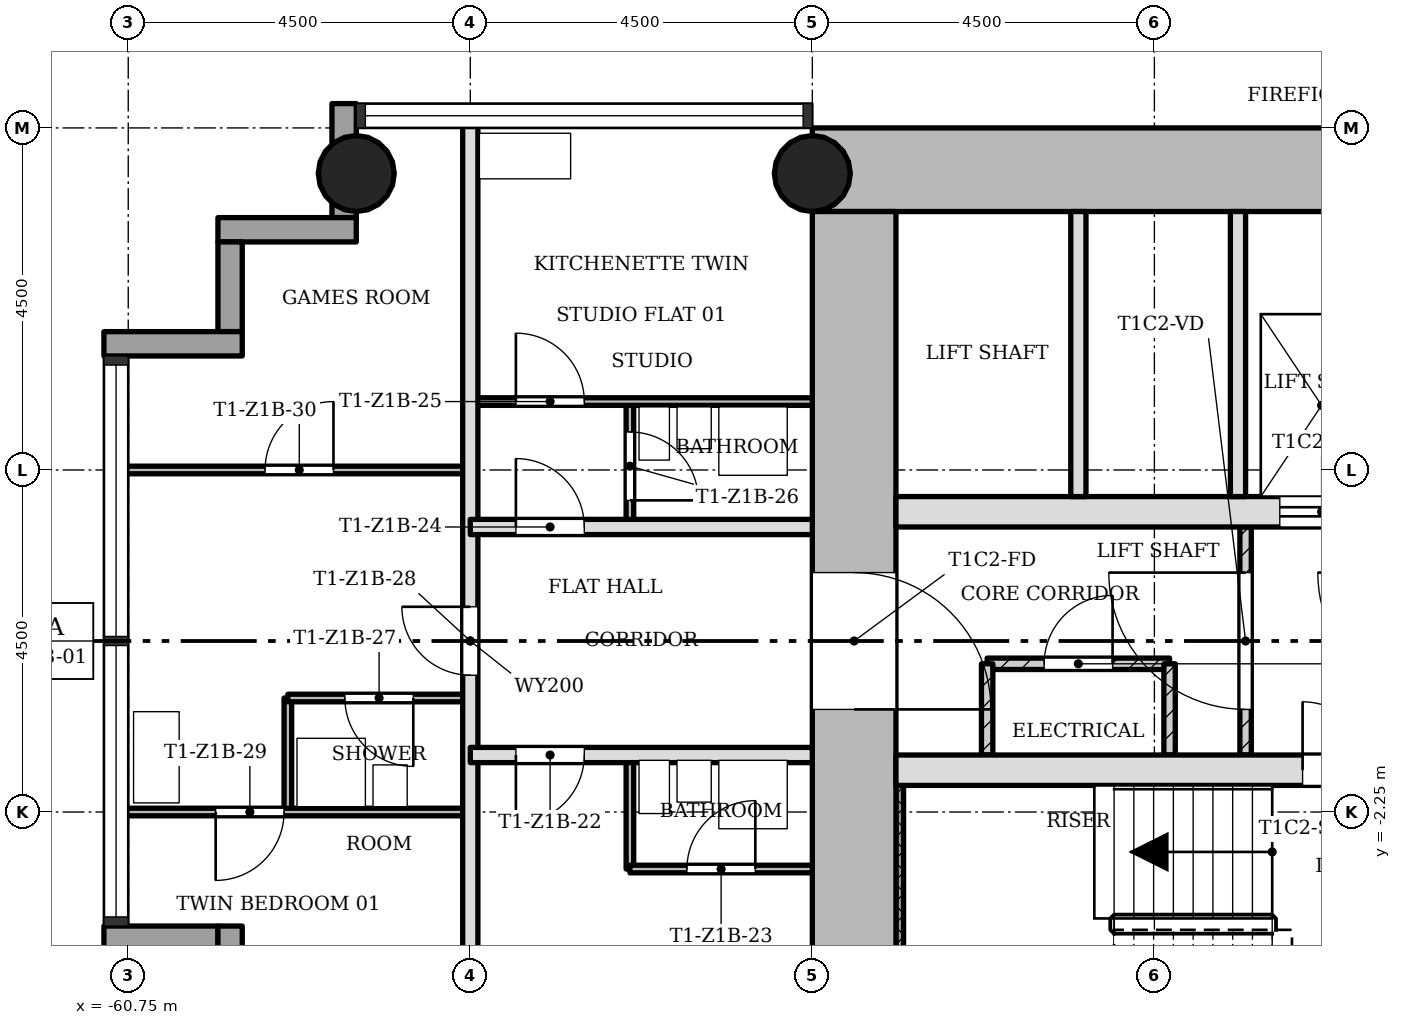
"""IFC4 building model, lengths in metres.
Left out: names, types, materials, properties, quantities, classifications, styles, units other than length and angle.
Written with IfcOpenShell. Run it as: python <this file> out.ifc"""

import sys

from ifc_helpers import new_model, si_unit, direction, frame, frame_2d, origin, origin_2d, place, context, subcontext, project, spatial, rectangle, hollow_circle, extrude, element, fill, save


model = new_model("IFC4")
c1 = context("Model", 3, precision=1e-05, world=origin(), true_north=direction((0.0, 1.0)))
c2 = subcontext(c1, "Body", "Model", "MODEL_VIEW")
j1 = project(units=[si_unit("LENGTHUNIT", "METRE"), si_unit("PLANEANGLEUNIT", "RADIAN")], contexts=[c1])
p1 = place(None, origin())
s1 = spatial("IfcSite", under=j1, at=p1, CompositionType="ELEMENT")
p2 = place(p1, origin())
s2 = spatial("IfcBuilding", under=s1, at=p2, CompositionType="ELEMENT")
p3 = place(p2, frame((0.0, 0.0, 34.7)))
s3 = spatial("IfcBuildingStorey", under=s2, at=p3, CompositionType="ELEMENT", Elevation=34.7)
p4 = place(p3, frame((-43.85, 6.2, 0.0), z_axis=(0.0, 0.0, 1.0), x_axis=(-1.0, 0.0, 0.0)))
e1 = element("IfcWall", 1, at=p4, inside=s3, PredefinedType="SHEAR", context=c2, shape_type="SweptSolid", body=[
    extrude(rectangle(XDim=7.9, YDim=1.1, at=frame_2d((3.95, 0.0))), origin(), (0.0, 0.0, 1.0), 3.4),
])
p5 = place(p3, frame((-51.2, 5.65, 0.0), z_axis=(0.0, 0.0, 1.0), x_axis=(0.0, -1.0, 0.0)))
e2 = element("IfcWall", 2, at=p5, inside=s3, PredefinedType="SHEAR", context=c2, shape_type="SweptSolid", body=[
    extrude(rectangle(XDim=12.4, YDim=1.1, at=frame_2d((6.2, 0.0))), origin(), (0.0, 0.0, 1.0), 3.4),
])
p6 = place(p5, frame((4.75, 0.0, 0.0)))
e3 = element("IfcOpeningElement", 3, at=p6, cuts=e2, PredefinedType="OPENING", context=c2, shape_type="SweptSolid", body=[
    extrude(rectangle(XDim=1.8, YDim=2.1, at=frame_2d((0.9, 1.05))), frame((0.0, 0.56, 0.0), z_axis=(0.0, -1.0, 0.0), x_axis=(1.0, 0.0, 0.0)), (0.0, 0.0, 1.0), 1.12),
])
p7 = place(p3, frame((-50.65, -1.7, 0.0), z_axis=(0.0, 0.0, 1.0), x_axis=(1.0, 0.0, 0.0)))
e4 = element("IfcWall", 4, at=p7, inside=s3, PredefinedType="SHEAR", context=c2, shape_type="SweptSolid", body=[
    extrude(rectangle(XDim=6.8, YDim=0.4, at=frame_2d((3.4, 0.0))), origin(), (0.0, 0.0, 1.0), 3.4),
])
p8 = place(p7, frame((5.35, 0.0, 0.0)))
e5 = element("IfcOpeningElement", 5, at=p8, cuts=e4, PredefinedType="OPENING", context=c2, shape_type="SweptSolid", body=[
    extrude(rectangle(XDim=0.9, YDim=2.1, at=frame_2d((0.45, 1.05))), frame((0.0, 0.21, 0.0), z_axis=(0.0, -1.0, 0.0), x_axis=(1.0, 0.0, 0.0)), (0.0, 0.0, 1.0), 0.42),
])
p9 = place(p3, frame((-50.65, 1.7, 0.0), z_axis=(0.0, 0.0, 1.0), x_axis=(1.0, 0.0, 0.0)))
e6 = element("IfcWall", 6, at=p9, inside=s3, PredefinedType="SHEAR", context=c2, shape_type="SweptSolid", body=[
    extrude(rectangle(XDim=6.8, YDim=0.4, at=frame_2d((3.4, 0.0))), origin(), (0.0, 0.0, 1.0), 3.4),
])
p10 = place(p9, frame((5.05, 0.0, 0.0)))
e7 = element("IfcOpeningElement", 7, at=p10, cuts=e6, PredefinedType="OPENING", context=c2, shape_type="SweptSolid", body=[
    extrude(rectangle(XDim=1.1, YDim=2.1, at=frame_2d((0.55, 1.05))), frame((0.0, 0.21, 0.0), z_axis=(0.0, -1.0, 0.0), x_axis=(1.0, 0.0, 0.0)), (0.0, 0.0, 1.0), 0.42),
])
for number, where, z_axis, x_axis in (
    (8, (-51.75, 6.15, 0.0), (0.0, 0.0, 1.0), (1.0, 0.0, 0.0)),
    (9, (-57.75, 6.15, 0.0), (0.0, 0.0, 1.0), (1.0, 0.0, 0.0)),
):
    element("IfcColumn", number, at=place(p3, frame(where, z_axis=z_axis, x_axis=x_axis)), inside=s3, PredefinedType="COLUMN", context=c2, shape_type="SweptSolid", body=[
        extrude(hollow_circle(Radius=0.5, WallThickness=0.036, at=origin_2d()), origin(), (0.0, 0.0, 1.0), 3.4),
    ])
p11 = place(p3, frame((-61.07, -3.91, -0.3), z_axis=(0.0, 0.0, 1.0), x_axis=(1.0, 0.0, 0.0)))
e10 = element("IfcWall", 10, at=p11, inside=s3, PredefinedType="STANDARD", context=c2, shape_type="SweptSolid", body=[
    extrude(rectangle(XDim=1.5, YDim=0.32, at=frame_2d((0.75, 0.0))), origin(), (0.0, 0.0, 1.0), 3.4),
])
p12 = place(p3, frame((-59.41, -3.75, -0.3), z_axis=(0.0, 0.0, 1.0), x_axis=(0.0, -1.0, 0.0)))
e11 = element("IfcWall", 11, at=p12, inside=s3, PredefinedType="STANDARD", context=c2, shape_type="SweptSolid", body=[
    extrude(rectangle(XDim=1.82, YDim=0.32, at=frame_2d((0.91, 0.0))), origin(), (0.0, 0.0, 1.0), 3.4),
])
p13 = place(p12, frame((0.41, 0.0, 1.2)))
e12 = element("IfcOpeningElement", 12, at=p13, cuts=e11, PredefinedType="OPENING", context=c2, shape_type="SweptSolid", body=[
    extrude(rectangle(XDim=1.0, YDim=1.5, at=frame_2d((0.5, 0.75))), frame((0.0, 0.17, 0.0), z_axis=(0.0, -1.0, 0.0), x_axis=(1.0, 0.0, 0.0)), (0.0, 0.0, 1.0), 0.34),
])
p14 = place(p3, frame((-57.91, 7.07, -0.3), z_axis=(0.0, 0.0, 1.0), x_axis=(0.0, -1.0, 0.0)))
e13 = element("IfcWall", 13, at=p14, inside=s3, PredefinedType="STANDARD", context=c2, shape_type="SweptSolid", body=[
    extrude(rectangle(XDim=1.5, YDim=0.32, at=frame_2d((0.75, 0.0))), origin(), (0.0, 0.0, 1.0), 3.4),
])
p15 = place(p3, frame((-57.75, 5.41, -0.3), z_axis=(0.0, 0.0, 1.0), x_axis=(-1.0, 0.0, 0.0)))
e14 = element("IfcWall", 14, at=p15, inside=s3, PredefinedType="STANDARD", context=c2, shape_type="SweptSolid", body=[
    extrude(rectangle(XDim=1.82, YDim=0.32, at=frame_2d((0.91, 0.0))), origin(), (0.0, 0.0, 1.0), 3.4),
])
p16 = place(p3, frame((-59.41, 5.25, -0.3), z_axis=(0.0, 0.0, 1.0), x_axis=(0.0, -1.0, 0.0)))
e15 = element("IfcWall", 15, at=p16, inside=s3, PredefinedType="STANDARD", context=c2, shape_type="SweptSolid", body=[
    extrude(rectangle(XDim=1.18, YDim=0.32, at=frame_2d((0.59, 0.0))), origin(), (0.0, 0.0, 1.0), 3.4),
])
p17 = place(p3, frame((-59.25, 3.91, -0.3), z_axis=(0.0, 0.0, 1.0), x_axis=(-1.0, 0.0, 0.0)))
e16 = element("IfcWall", 16, at=p17, inside=s3, PredefinedType="STANDARD", context=c2, shape_type="SweptSolid", body=[
    extrude(rectangle(XDim=1.82, YDim=0.32, at=frame_2d((0.91, 0.0))), origin(), (0.0, 0.0, 1.0), 3.4),
])
p18 = place(p3, frame((-46.05, 1.5, 0.0), z_axis=(0.0, 0.0, 1.0), x_axis=(0.0, -1.0, 0.0)))
e17 = element("IfcWall", 17, at=p18, inside=s3, PredefinedType="PARTITIONING", context=c2, shape_type="SweptSolid", body=[
    extrude(rectangle(XDim=3.0, YDim=0.15, at=frame_2d((1.5, 0.0))), origin(), (0.0, 0.0, 1.0), 3.0),
])
p19 = place(p18, frame((0.6, 0.0, 0.0)))
e18 = element("IfcOpeningElement", 18, at=p19, cuts=e17, PredefinedType="OPENING", context=c2, shape_type="SweptSolid", body=[
    extrude(rectangle(XDim=1.8, YDim=2.1, at=frame_2d((0.9, 1.05))), frame((0.0, 0.085, 0.0), z_axis=(0.0, -1.0, 0.0), x_axis=(1.0, 0.0, 0.0)), (0.0, 0.0, 1.0), 0.17),
])
for number, where, z_axis, x_axis in (
    (19, (-46.15, 5.65, 0.0), (0.0, 0.0, 1.0), (0.0, -1.0, 0.0)),
    (20, (-48.25, 5.65, 0.0), (0.0, 0.0, 1.0), (0.0, -1.0, 0.0)),
):
    element("IfcWall", number, at=place(p3, frame(where, z_axis=z_axis, x_axis=x_axis)), inside=s3, PredefinedType="SOLIDWALL", context=c2, shape_type="SweptSolid", body=[
        extrude(rectangle(XDim=3.75, YDim=0.2, at=frame_2d((1.875, 0.0))), origin(), (0.0, 0.0, 1.0), 3.0),
    ])
p20 = place(p3, frame((-47.05, -0.3, 0.0), z_axis=(0.0, 0.0, 1.0), x_axis=(-1.0, 0.0, 0.0)))
e21 = element("IfcWall", 21, at=p20, inside=s3, PredefinedType="PARTITIONING", context=c2, shape_type="SweptSolid", body=[
    extrude(rectangle(XDim=2.4, YDim=0.15, at=frame_2d((1.2, 0.0))), origin(), (0.0, 0.0, 1.0), 3.0),
])
p21 = place(p20, frame((0.75, 0.0, 0.0)))
e22 = element("IfcOpeningElement", 22, at=p21, cuts=e21, PredefinedType="OPENING", context=c2, shape_type="SweptSolid", body=[
    extrude(rectangle(XDim=0.9, YDim=2.1, at=frame_2d((0.45, 1.05))), frame((0.0, 0.085, 0.0), z_axis=(0.0, -1.0, 0.0), x_axis=(1.0, 0.0, 0.0)), (0.0, 0.0, 1.0), 0.17),
])
for number, where, z_axis, x_axis in (
    (23, (-47.05, -0.3, 0.0), (0.0, 0.0, 1.0), (0.0, -1.0, 0.0)),
    (24, (-49.45, -0.3, 0.0), (0.0, 0.0, 1.0), (0.0, -1.0, 0.0)),
):
    element("IfcWall", number, at=place(p3, frame(where, z_axis=z_axis, x_axis=x_axis)), inside=s3, PredefinedType="PARTITIONING", context=c2, shape_type="SweptSolid", body=[
        extrude(rectangle(XDim=1.2, YDim=0.15, at=frame_2d((0.6, 0.0))), origin(), (0.0, 0.0, 1.0), 3.0),
    ])
p22 = place(p3, frame((-58.65, -2.25, 0.0), z_axis=(0.0, 0.0, 1.0), x_axis=(0.0, 1.0, 0.0)))
e25 = element("IfcWall", 25, at=p22, inside=s3, PredefinedType="PARTITIONING", context=c2, shape_type="SweptSolid", body=[
    extrude(rectangle(XDim=1.5, YDim=0.1, at=frame_2d((0.75, 0.0))), origin(), (0.0, 0.0, 1.0), 3.0),
])
p23 = place(p3, frame((-56.25, -6.85, 0.0), z_axis=(0.0, 0.0, 1.0), x_axis=(0.0, 1.0, 0.0)))
e26 = element("IfcWall", 26, at=p23, inside=s3, PredefinedType="SOLIDWALL", context=c2, shape_type="SweptSolid", body=[
    extrude(rectangle(XDim=13.7, YDim=0.2, at=frame_2d((6.85, 0.0))), origin(), (0.0, 0.0, 1.0), 3.0),
])
p24 = place(p23, frame((6.4, 0.0, 0.0)))
e27 = element("IfcOpeningElement", 27, at=p24, cuts=e26, PredefinedType="OPENING", context=c2, shape_type="SweptSolid", body=[
    extrude(rectangle(XDim=0.9, YDim=2.1, at=frame_2d((0.45, 1.05))), frame((0.0, 0.11, 0.0), z_axis=(0.0, -1.0, 0.0), x_axis=(1.0, 0.0, 0.0)), (0.0, 0.0, 1.0), 0.22),
])
p25 = place(p3, frame((-54.15, -3.0, 0.0), z_axis=(0.0, 0.0, 1.0), x_axis=(0.0, 1.0, 0.0)))
e28 = element("IfcWall", 28, at=p25, inside=s3, PredefinedType="PARTITIONING", context=c2, shape_type="SweptSolid", body=[
    extrude(rectangle(XDim=1.5, YDim=0.1, at=frame_2d((0.75, 0.0))), origin(), (0.0, 0.0, 1.0), 3.0),
])
p26 = place(p3, frame((-54.15, 1.5, 0.0), z_axis=(0.0, 0.0, 1.0), x_axis=(0.0, 1.0, 0.0)))
e29 = element("IfcWall", 29, at=p26, inside=s3, PredefinedType="PARTITIONING", context=c2, shape_type="SweptSolid", body=[
    extrude(rectangle(XDim=1.65, YDim=0.1, at=frame_2d((0.825, 0.0))), origin(), (0.0, 0.0, 1.0), 3.0),
])
p27 = place(p26, frame((0.35, 0.0, 0.0)))
e30 = element("IfcOpeningElement", 30, at=p27, cuts=e29, PredefinedType="OPENING", context=c2, shape_type="SweptSolid", body=[
    extrude(rectangle(XDim=0.9, YDim=2.1, at=frame_2d((0.45, 1.05))), frame((0.0, 0.06, 0.0), z_axis=(0.0, -1.0, 0.0), x_axis=(1.0, 0.0, 0.0)), (0.0, 0.0, 1.0), 0.12),
])
p28 = place(p3, frame((-54.15, -3.0, 0.0), z_axis=(0.0, 0.0, 1.0), x_axis=(1.0, 0.0, 0.0)))
e31 = element("IfcWall", 31, at=p28, inside=s3, PredefinedType="PARTITIONING", context=c2, shape_type="SweptSolid", body=[
    extrude(rectangle(XDim=2.4, YDim=0.1, at=frame_2d((1.2, 0.0))), origin(), (0.0, 0.0, 1.0), 3.0),
])
p29 = place(p28, frame((0.75, 0.0, 0.0)))
e32 = element("IfcOpeningElement", 32, at=p29, cuts=e31, PredefinedType="OPENING", context=c2, shape_type="SweptSolid", body=[
    extrude(rectangle(XDim=0.9, YDim=2.1, at=frame_2d((0.45, 1.05))), frame((0.0, 0.06, 0.0), z_axis=(0.0, -1.0, 0.0), x_axis=(1.0, 0.0, 0.0)), (0.0, 0.0, 1.0), 0.12),
])
p30 = place(p3, frame((-60.85, -2.25, 0.0), z_axis=(0.0, 0.0, 1.0), x_axis=(1.0, 0.0, 0.0)))
e33 = element("IfcWall", 33, at=p30, inside=s3, PredefinedType="PARTITIONING", context=c2, shape_type="SweptSolid", body=[
    extrude(rectangle(XDim=4.6, YDim=0.1, at=frame_2d((2.3, 0.0))), origin(), (0.0, 0.0, 1.0), 3.0),
])
p31 = place(p30, frame((1.25, 0.0, 0.0)))
e34 = element("IfcOpeningElement", 34, at=p31, cuts=e33, PredefinedType="OPENING", context=c2, shape_type="SweptSolid", body=[
    extrude(rectangle(XDim=0.9, YDim=2.1, at=frame_2d((0.45, 1.05))), frame((0.0, 0.06, 0.0), z_axis=(0.0, -1.0, 0.0), x_axis=(1.0, 0.0, 0.0)), (0.0, 0.0, 1.0), 0.12),
])
p32 = place(p3, frame((-56.25, -1.5, 0.0), z_axis=(0.0, 0.0, 1.0), x_axis=(1.0, 0.0, 0.0)))
e35 = element("IfcWall", 35, at=p32, inside=s3, PredefinedType="SOLIDWALL", context=c2, shape_type="SweptSolid", body=[
    extrude(rectangle(XDim=4.5, YDim=0.2, at=frame_2d((2.25, 0.0))), origin(), (0.0, 0.0, 1.0), 3.0),
])
p33 = place(p32, frame((0.6, 0.0, 0.0)))
e36 = element("IfcOpeningElement", 36, at=p33, cuts=e35, PredefinedType="OPENING", context=c2, shape_type="SweptSolid", body=[
    extrude(rectangle(XDim=0.9, YDim=2.1, at=frame_2d((0.45, 1.05))), frame((0.0, 0.11, 0.0), z_axis=(0.0, -1.0, 0.0), x_axis=(1.0, 0.0, 0.0)), (0.0, 0.0, 1.0), 0.22),
])
p34 = place(p3, frame((-58.65, -0.75, 0.0), z_axis=(0.0, 0.0, 1.0), x_axis=(1.0, 0.0, 0.0)))
e37 = element("IfcWall", 37, at=p34, inside=s3, PredefinedType="PARTITIONING", context=c2, shape_type="SweptSolid", body=[
    extrude(rectangle(XDim=2.4, YDim=0.1, at=frame_2d((1.2, 0.0))), origin(), (0.0, 0.0, 1.0), 3.0),
])
p35 = place(p34, frame((0.75, 0.0, 0.0)))
e38 = element("IfcOpeningElement", 38, at=p35, cuts=e37, PredefinedType="OPENING", context=c2, shape_type="SweptSolid", body=[
    extrude(rectangle(XDim=0.9, YDim=2.1, at=frame_2d((0.45, 1.05))), frame((0.0, 0.06, 0.0), z_axis=(0.0, -1.0, 0.0), x_axis=(1.0, 0.0, 0.0)), (0.0, 0.0, 1.0), 0.12),
])
p36 = place(p3, frame((-56.25, 1.5, 0.0), z_axis=(0.0, 0.0, 1.0), x_axis=(1.0, 0.0, 0.0)))
e39 = element("IfcWall", 39, at=p36, inside=s3, PredefinedType="SOLIDWALL", context=c2, shape_type="SweptSolid", body=[
    extrude(rectangle(XDim=4.5, YDim=0.2, at=frame_2d((2.25, 0.0))), origin(), (0.0, 0.0, 1.0), 3.0),
])
p37 = place(p36, frame((0.6, 0.0, 0.0)))
e40 = element("IfcOpeningElement", 40, at=p37, cuts=e39, PredefinedType="OPENING", context=c2, shape_type="SweptSolid", body=[
    extrude(rectangle(XDim=0.9, YDim=2.1, at=frame_2d((0.45, 1.05))), frame((0.0, 0.11, 0.0), z_axis=(0.0, -1.0, 0.0), x_axis=(1.0, 0.0, 0.0)), (0.0, 0.0, 1.0), 0.22),
])
p38 = place(p3, frame((-60.85, 2.25, 0.0), z_axis=(0.0, 0.0, 1.0), x_axis=(1.0, 0.0, 0.0)))
e41 = element("IfcWall", 41, at=p38, inside=s3, PredefinedType="PARTITIONING", context=c2, shape_type="SweptSolid", body=[
    extrude(rectangle(XDim=4.6, YDim=0.1, at=frame_2d((2.3, 0.0))), origin(), (0.0, 0.0, 1.0), 3.0),
])
p39 = place(p38, frame((1.9, 0.0, 0.0)))
e42 = element("IfcOpeningElement", 42, at=p39, cuts=e41, PredefinedType="OPENING", context=c2, shape_type="SweptSolid", body=[
    extrude(rectangle(XDim=0.9, YDim=2.1, at=frame_2d((0.45, 1.05))), frame((0.0, 0.06, 0.0), z_axis=(0.0, -1.0, 0.0), x_axis=(1.0, 0.0, 0.0)), (0.0, 0.0, 1.0), 0.12),
])
p40 = place(p3, frame((-56.25, 3.15, 0.0), z_axis=(0.0, 0.0, 1.0), x_axis=(1.0, 0.0, 0.0)))
e43 = element("IfcWall", 43, at=p40, inside=s3, PredefinedType="PARTITIONING", context=c2, shape_type="SweptSolid", body=[
    extrude(rectangle(XDim=4.5, YDim=0.1, at=frame_2d((2.25, 0.0))), origin(), (0.0, 0.0, 1.0), 3.0),
])
p41 = place(p40, frame((0.6, 0.0, 0.0)))
e44 = element("IfcOpeningElement", 44, at=p41, cuts=e43, PredefinedType="OPENING", context=c2, shape_type="SweptSolid", body=[
    extrude(rectangle(XDim=0.9, YDim=2.1, at=frame_2d((0.45, 1.05))), frame((0.0, 0.06, 0.0), z_axis=(0.0, -1.0, 0.0), x_axis=(1.0, 0.0, 0.0)), (0.0, 0.0, 1.0), 0.12),
])
p42 = place(p3, frame((-50.6, -1.9, 0.0), z_axis=(0.0, 0.0, 1.0), x_axis=(0.0, -1.0, 0.0)))
e45 = element("IfcWall", 45, at=p42, inside=s3, PredefinedType="SHEAR", context=c2, shape_type="SweptSolid", body=[
    extrude(rectangle(XDim=3.75, YDim=0.1, at=frame_2d((1.875, 0.0))), origin(), (0.0, 0.0, 1.0), 3.4),
])
p43 = place(p19, origin())
e46 = element("IfcDoor", 46, at=p43, inside=s3, OperationType="SINGLE_SWING_LEFT", PredefinedType="DOOR", context=c2, shape_type="SweptSolid", body=[
    extrude(rectangle(XDim=1.8, YDim=2.1, at=frame_2d((0.9, 1.05))), frame((0.0, 0.025, 0.0), z_axis=(0.0, -1.0, 0.0), x_axis=(1.0, 0.0, 0.0)), (0.0, 0.0, 1.0), 0.05),
])
fill(e18, e46)
p44 = place(p21, origin())
e47 = element("IfcDoor", 47, at=p44, inside=s3, OperationType="SINGLE_SWING_LEFT", PredefinedType="DOOR", context=c2, shape_type="SweptSolid", body=[
    extrude(rectangle(XDim=0.9, YDim=2.1, at=frame_2d((0.45, 1.05))), frame((0.0, 0.025, 0.0), z_axis=(0.0, -1.0, 0.0), x_axis=(1.0, 0.0, 0.0)), (0.0, 0.0, 1.0), 0.05),
])
fill(e22, e47)
p45 = place(p33, origin())
e48 = element("IfcDoor", 48, at=p45, inside=s3, OperationType="SINGLE_SWING_LEFT", PredefinedType="DOOR", context=c2, shape_type="SweptSolid", body=[
    extrude(rectangle(XDim=0.9, YDim=2.1, at=frame_2d((0.45, 1.05))), frame((0.0, 0.025, 0.0), z_axis=(0.0, -1.0, 0.0), x_axis=(1.0, 0.0, 0.0)), (0.0, 0.0, 1.0), 0.05),
])
fill(e36, e48)
p46 = place(p29, origin())
e49 = element("IfcDoor", 49, at=p46, inside=s3, OperationType="SINGLE_SWING_LEFT", PredefinedType="DOOR", context=c2, shape_type="SweptSolid", body=[
    extrude(rectangle(XDim=0.9, YDim=2.1, at=frame_2d((0.45, 1.05))), frame((0.0, 0.025, 0.0), z_axis=(0.0, -1.0, 0.0), x_axis=(1.0, 0.0, 0.0)), (0.0, 0.0, 1.0), 0.05),
])
fill(e32, e49)
p47 = place(p37, origin())
e50 = element("IfcDoor", 50, at=p47, inside=s3, OperationType="SINGLE_SWING_RIGHT", PredefinedType="DOOR", context=c2, shape_type="SweptSolid", body=[
    extrude(rectangle(XDim=0.9, YDim=2.1, at=frame_2d((0.45, 1.05))), frame((0.0, 0.025, 0.0), z_axis=(0.0, -1.0, 0.0), x_axis=(1.0, 0.0, 0.0)), (0.0, 0.0, 1.0), 0.05),
])
fill(e40, e50)
p48 = place(p41, origin())
e51 = element("IfcDoor", 51, at=p48, inside=s3, OperationType="SINGLE_SWING_RIGHT", PredefinedType="DOOR", context=c2, shape_type="SweptSolid", body=[
    extrude(rectangle(XDim=0.9, YDim=2.1, at=frame_2d((0.45, 1.05))), frame((0.0, 0.025, 0.0), z_axis=(0.0, -1.0, 0.0), x_axis=(1.0, 0.0, 0.0)), (0.0, 0.0, 1.0), 0.05),
])
fill(e44, e51)
p49 = place(p27, origin())
e52 = element("IfcDoor", 52, at=p49, inside=s3, OperationType="SINGLE_SWING_LEFT", PredefinedType="DOOR", context=c2, shape_type="SweptSolid", body=[
    extrude(rectangle(XDim=0.9, YDim=2.1, at=frame_2d((0.45, 1.05))), frame((0.0, 0.025, 0.0), z_axis=(0.0, -1.0, 0.0), x_axis=(1.0, 0.0, 0.0)), (0.0, 0.0, 1.0), 0.05),
])
fill(e30, e52)
p50 = place(p35, origin())
e53 = element("IfcDoor", 53, at=p50, inside=s3, OperationType="SINGLE_SWING_RIGHT", PredefinedType="DOOR", context=c2, shape_type="SweptSolid", body=[
    extrude(rectangle(XDim=0.9, YDim=2.1, at=frame_2d((0.45, 1.05))), frame((0.0, 0.025, 0.0), z_axis=(0.0, -1.0, 0.0), x_axis=(1.0, 0.0, 0.0)), (0.0, 0.0, 1.0), 0.05),
])
fill(e38, e53)
p51 = place(p24, origin())
e54 = element("IfcDoor", 54, at=p51, inside=s3, OperationType="SINGLE_SWING_LEFT", PredefinedType="DOOR", context=c2, shape_type="SweptSolid", body=[
    extrude(rectangle(XDim=0.9, YDim=2.1, at=frame_2d((0.45, 1.05))), frame((0.0, 0.025, 0.0), z_axis=(0.0, -1.0, 0.0), x_axis=(1.0, 0.0, 0.0)), (0.0, 0.0, 1.0), 0.05),
])
fill(e27, e54)
p52 = place(p31, origin())
e55 = element("IfcDoor", 55, at=p52, inside=s3, OperationType="SINGLE_SWING_LEFT", PredefinedType="DOOR", context=c2, shape_type="SweptSolid", body=[
    extrude(rectangle(XDim=0.9, YDim=2.1, at=frame_2d((0.45, 1.05))), frame((0.0, 0.025, 0.0), z_axis=(0.0, -1.0, 0.0), x_axis=(1.0, 0.0, 0.0)), (0.0, 0.0, 1.0), 0.05),
])
fill(e34, e55)
p53 = place(p39, origin())
e56 = element("IfcDoor", 56, at=p53, inside=s3, OperationType="SINGLE_SWING_LEFT", PredefinedType="DOOR", context=c2, shape_type="SweptSolid", body=[
    extrude(rectangle(XDim=0.9, YDim=2.1, at=frame_2d((0.45, 1.05))), frame((0.0, 0.025, 0.0), z_axis=(0.0, -1.0, 0.0), x_axis=(1.0, 0.0, 0.0)), (0.0, 0.0, 1.0), 0.05),
])
fill(e42, e56)
p54 = place(p8, origin())
e57 = element("IfcDoor", 57, at=p54, inside=s3, OperationType="SINGLE_SWING_RIGHT", PredefinedType="DOOR", context=c2, shape_type="SweptSolid", body=[
    extrude(rectangle(XDim=0.9, YDim=2.1, at=frame_2d((0.45, 1.05))), frame((0.0, 0.025, 0.0), z_axis=(0.0, -1.0, 0.0), x_axis=(1.0, 0.0, 0.0)), (0.0, 0.0, 1.0), 0.05),
])
fill(e5, e57)
p55 = place(p10, origin())
e58 = element("IfcDoor", 58, at=p55, inside=s3, OperationType="SLIDING_TO_LEFT", PredefinedType="DOOR", context=c2, shape_type="SweptSolid", body=[
    extrude(rectangle(XDim=1.1, YDim=2.1, at=frame_2d((0.55, 1.05))), frame((0.0, 0.025, 0.0), z_axis=(0.0, -1.0, 0.0), x_axis=(1.0, 0.0, 0.0)), (0.0, 0.0, 1.0), 0.05),
])
fill(e7, e58)
p56 = place(p6, origin())
e59 = element("IfcDoor", 59, at=p56, inside=s3, OperationType="SINGLE_SWING_LEFT", PredefinedType="DOOR", context=c2, shape_type="SweptSolid", body=[
    extrude(rectangle(XDim=1.8, YDim=2.1, at=frame_2d((0.9, 1.05))), frame((0.0, 0.025, 0.0), z_axis=(0.0, -1.0, 0.0), x_axis=(1.0, 0.0, 0.0)), (0.0, 0.0, 1.0), 0.05),
])
fill(e3, e59)
save(model, sys.argv[1])
